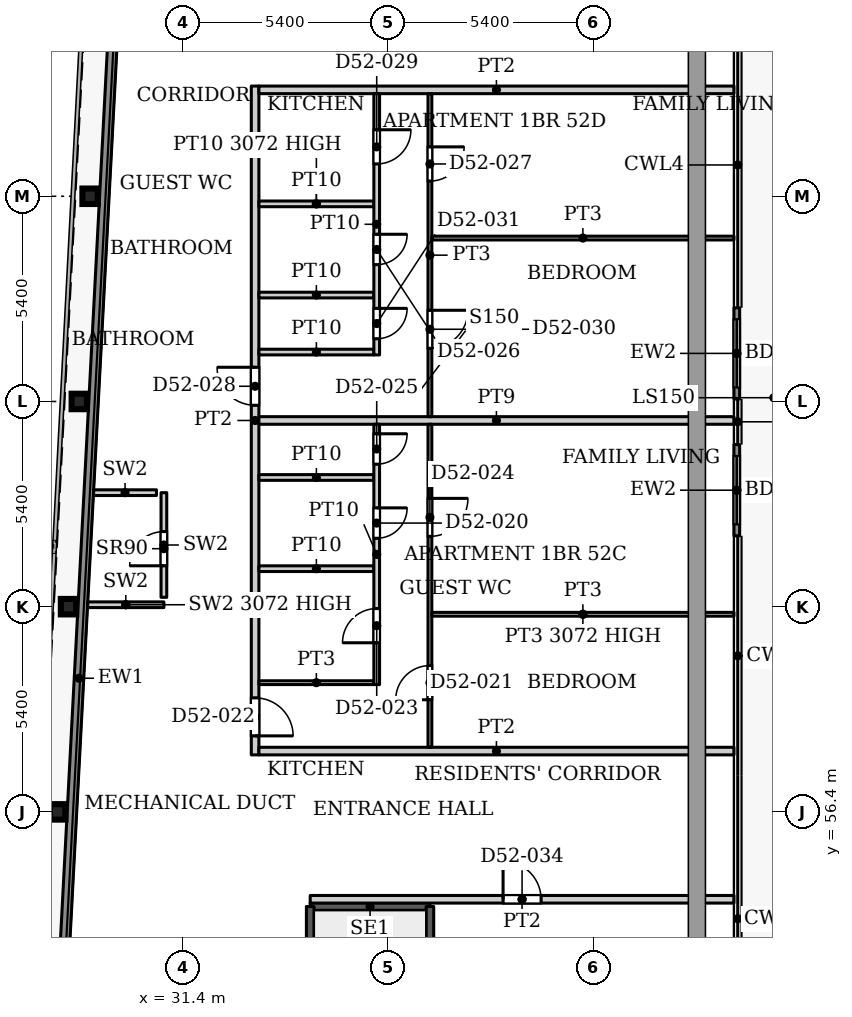
"""IFC4 building model, lengths in metres.
Left out: names, types, materials, properties, quantities, classifications, styles, units other than length and angle.
Written with IfcOpenShell. Run it as: python <this file> out.ifc"""

import sys

from ifc_helpers import new_model, si_unit, direction, frame, frame_2d, origin, origin_2d, place, context, subcontext, project, spatial, rectangle, i_section, extrude, source, transform, mapped, element, fill, save


model = new_model("IFC4")
c1 = context("Model", 3, precision=1e-05, world=origin(), true_north=direction((0.0, 1.0)))
c2 = subcontext(c1, "Body", "Model", "MODEL_VIEW")
j1 = project(units=[si_unit("LENGTHUNIT", "METRE"), si_unit("PLANEANGLEUNIT", "RADIAN")], contexts=[c1])
p1 = place(None, origin())
s1 = spatial("IfcSite", under=j1, at=p1, CompositionType="ELEMENT")
p2 = place(p1, origin())
s2 = spatial("IfcBuilding", under=s1, at=p2, CompositionType="ELEMENT")
p3 = place(p2, frame((0.0, 0.0, 224.0)))
s3 = spatial("IfcBuildingStorey", under=s2, at=p3, CompositionType="ELEMENT", Elevation=224.0)
for number, where, z_axis, x_axis in (
    (1, (28.106, 56.4, 0.0), (0.0, 0.0, 1.0), (1.0, 0.0, 0.0)),
    (2, (28.39, 61.8, 0.0), (0.0, 0.0, 1.0), (1.0, 0.0, 0.0)),
    (3, (28.674, 67.2, 0.0), (0.0, 0.0, 1.0), (1.0, 0.0, 0.0)),
    (4, (28.958, 72.6, 0.0), (0.0, 0.0, 1.0), (1.0, 0.0, 0.0)),
):
    element("IfcColumn", number, at=place(p3, frame(where, z_axis=z_axis, x_axis=x_axis)), inside=s3, PredefinedType="COLUMN", context=c2, shape_type="SweptSolid", body=[
        extrude(i_section(OverallWidth=0.404, OverallDepth=0.407, WebThickness=0.027, FlangeThickness=0.044, FilletRadius=0.012, at=origin_2d()), origin(), (0.0, 0.0, 1.0), 3.9),
    ])
p4 = place(p3, frame((45.975, 69.665, 0.0), z_axis=(0.0, 0.0, 1.0), x_axis=(0.0, -1.0, 0.0)))
e5 = element("IfcWall", 5, at=p4, inside=s3, PredefinedType="SOLIDWALL", context=c2, shape_type="SweptSolid", body=[
    extrude(rectangle(XDim=2.4, YDim=0.15, at=frame_2d((1.2, 0.0))), origin(), (0.0, 0.0, 1.0), 3.75),
])
p5 = place(p4, frame((0.3, 0.0, 0.0)))
e6 = element("IfcOpeningElement", 6, at=p5, cuts=e5, PredefinedType="OPENING", context=c2, shape_type="SweptSolid", body=[
    extrude(rectangle(XDim=1.8, YDim=2.4, at=frame_2d((0.9, 1.2))), frame((0.0, 0.085, 0.0), z_axis=(0.0, -1.0, 0.0), x_axis=(1.0, 0.0, 0.0)), (0.0, 0.0, 1.0), 0.17),
])
p6 = place(p3, frame((45.975, 66.065, 0.0), z_axis=(0.0, 0.0, 1.0), x_axis=(0.0, -1.0, 0.0)))
e7 = element("IfcWall", 7, at=p6, inside=s3, PredefinedType="SOLIDWALL", context=c2, shape_type="SweptSolid", body=[
    extrude(rectangle(XDim=2.4, YDim=0.15, at=frame_2d((1.2, 0.0))), origin(), (0.0, 0.0, 1.0), 3.75),
])
p7 = place(p6, frame((0.3, 0.0, 0.0)))
e8 = element("IfcOpeningElement", 8, at=p7, cuts=e7, PredefinedType="OPENING", context=c2, shape_type="SweptSolid", body=[
    extrude(rectangle(XDim=1.8, YDim=2.4, at=frame_2d((0.9, 1.2))), frame((0.0, 0.085, 0.0), z_axis=(0.0, -1.0, 0.0), x_axis=(1.0, 0.0, 0.0)), (0.0, 0.0, 1.0), 0.17),
])
p8 = place(p3, frame((27.195, 31.969, 0.0), z_axis=(0.0, 0.0, 1.0), x_axis=(0.052559748861, 0.998617781135, 0.0)))
e9 = element("IfcWall", 9, at=p8, inside=s3, PredefinedType="SOLIDWALL", context=c2, shape_type="SweptSolid", body=[
    extrude(rectangle(XDim=55.972, YDim=0.25, at=frame_2d((27.986, 0.0))), origin(), (0.0, 0.0, 1.0), 3.75),
])
p9 = place(p3, frame((34.75, 53.91, 0.0), z_axis=(0.0, 0.0, 1.0), x_axis=(1.0, 0.0, 0.0)))
e10 = element("IfcWall", 10, at=p9, inside=s3, PredefinedType="SHEAR", context=c2, shape_type="SweptSolid", body=[
    extrude(rectangle(XDim=3.15, YDim=0.2, at=frame_2d((1.575, 0.0))), origin(), (0.0, 0.0, 1.0), 3.9),
])
p10 = place(p3, frame((34.75, 47.5, 0.0), z_axis=(0.0, 0.0, 1.0), x_axis=(0.0, 1.0, 0.0)))
e11 = element("IfcWall", 11, at=p10, inside=s3, PredefinedType="SHEAR", context=c2, shape_type="SweptSolid", body=[
    extrude(rectangle(XDim=6.41, YDim=0.2, at=frame_2d((3.205, 0.0))), origin(), (0.0, 0.0, 1.0), 3.9),
])
p11 = place(p3, frame((37.9, 44.75, 0.0), z_axis=(0.0, 0.0, 1.0), x_axis=(0.0, 1.0, 0.0)))
e12 = element("IfcWall", 12, at=p11, inside=s3, PredefinedType="SHEAR", context=c2, shape_type="SweptSolid", body=[
    extrude(rectangle(XDim=9.16, YDim=0.2, at=frame_2d((4.58, 0.0))), origin(), (0.0, 0.0, 1.0), 3.9),
])
p12 = place(p3, frame((28.896, 61.851, 0.0), z_axis=(0.0, 0.0, 1.0), x_axis=(1.0, 0.0, 0.0)))
e13 = element("IfcWall", 13, at=p12, inside=s3, PredefinedType="PARTITIONING", context=c2, shape_type="SweptSolid", body=[
    extrude(rectangle(XDim=2.004, YDim=0.15, at=frame_2d((1.002, 0.0))), origin(), (0.0, 0.0, 1.0), 3.072),
])
p13 = place(p3, frame((30.9, 62.046, 0.0), z_axis=(0.0, 0.0, 1.0), x_axis=(0.0, 1.0, 0.0)))
e14 = element("IfcWall", 14, at=p13, inside=s3, PredefinedType="PARTITIONING", context=c2, shape_type="SweptSolid", body=[
    extrude(rectangle(XDim=2.754, YDim=0.15, at=frame_2d((1.377, 0.0))), origin(), (0.0, 0.0, 1.0), 3.9),
])
p14 = place(p13, frame((0.83, 0.0, 0.0)))
e15 = element("IfcOpeningElement", 15, at=p14, cuts=e14, PredefinedType="OPENING", context=c2, shape_type="SweptSolid", body=[
    extrude(rectangle(XDim=0.9, YDim=2.2, at=frame_2d((0.45, 1.1))), frame((0.0, 0.085, 0.0), z_axis=(0.0, -1.0, 0.0), x_axis=(1.0, 0.0, 0.0)), (0.0, 0.0, 1.0), 0.17),
])
p15 = place(p3, frame((29.051, 64.8, 0.0), z_axis=(0.0, 0.0, 1.0), x_axis=(1.0, 0.0, 0.0)))
e16 = element("IfcWall", 16, at=p15, inside=s3, PredefinedType="PARTITIONING", context=c2, shape_type="SweptSolid", body=[
    extrude(rectangle(XDim=1.654, YDim=0.15, at=frame_2d((0.827, 0.0))), origin(), (0.0, 0.0, 1.0), 3.9),
])
p16 = place(p3, frame((33.3, 57.9, 0.0), z_axis=(0.0, 0.0, 1.0), x_axis=(0.0, 1.0, 0.0)))
e17 = element("IfcWall", 17, at=p16, inside=s3, PredefinedType="PARTITIONING", context=c2, shape_type="SweptSolid", body=[
    extrude(rectangle(XDim=17.6, YDim=0.2, at=frame_2d((8.8, 0.0))), origin(), (0.0, 0.0, 1.0), 3.6),
])
p17 = place(p16, frame((0.5, 0.0, 0.0)))
e18 = element("IfcOpeningElement", 18, at=p17, cuts=e17, PredefinedType="OPENING", context=c2, shape_type="SweptSolid", body=[
    extrude(rectangle(XDim=1.0, YDim=2.1, at=frame_2d((0.5, 1.05))), frame((0.0, 0.11, 0.0), z_axis=(0.0, -1.0, 0.0), x_axis=(1.0, 0.0, 0.0)), (0.0, 0.0, 1.0), 0.22),
])
p18 = place(p16, frame((9.2, 0.0, 0.0)))
e19 = element("IfcOpeningElement", 19, at=p18, cuts=e17, PredefinedType="OPENING", context=c2, shape_type="SweptSolid", body=[
    extrude(rectangle(XDim=1.0, YDim=2.1, at=frame_2d((0.5, 1.05))), frame((0.0, 0.11, 0.0), z_axis=(0.0, -1.0, 0.0), x_axis=(1.0, 0.0, 0.0)), (0.0, 0.0, 1.0), 0.22),
])
p19 = place(p3, frame((33.4, 58.0, 0.0), z_axis=(0.0, 0.0, 1.0), x_axis=(1.0, 0.0, 0.0)))
e20 = element("IfcWall", 20, at=p19, inside=s3, PredefinedType="PARTITIONING", context=c2, shape_type="SweptSolid", body=[
    extrude(rectangle(XDim=12.5, YDim=0.2, at=frame_2d((6.25, 0.0))), origin(), (0.0, 0.0, 1.0), 3.6),
])
p20 = place(p3, frame((33.4, 59.8, 0.0), z_axis=(0.0, 0.0, 1.0), x_axis=(1.0, 0.0, 0.0)))
e21 = element("IfcWall", 21, at=p20, inside=s3, PredefinedType="PARTITIONING", context=c2, shape_type="SweptSolid", body=[
    extrude(rectangle(XDim=3.025, YDim=0.1, at=frame_2d((1.513, 0.0))), origin(), (0.0, 0.0, 1.0), 3.6),
])
for number, where, z_axis, x_axis in (
    (22, (33.4, 62.8, 0.0), (0.0, 0.0, 1.0), (1.0, 0.0, 0.0)),
    (23, (33.4, 65.2, 0.0), (0.0, 0.0, 1.0), (1.0, 0.0, 0.0)),
):
    element("IfcWall", number, at=place(p3, frame(where, z_axis=z_axis, x_axis=x_axis)), inside=s3, PredefinedType="PARTITIONING", context=c2, shape_type="SweptSolid", body=[
        extrude(rectangle(XDim=3.025, YDim=0.15, at=frame_2d((1.513, 0.0))), origin(), (0.0, 0.0, 1.0), 3.6),
    ])
p21 = place(p3, frame((33.4, 66.7, 0.0), z_axis=(0.0, 0.0, 1.0), x_axis=(1.0, 0.0, 0.0)))
e24 = element("IfcWall", 24, at=p21, inside=s3, PredefinedType="PARTITIONING", context=c2, shape_type="SweptSolid", body=[
    extrude(rectangle(XDim=12.5, YDim=0.2, at=frame_2d((6.25, 0.0))), origin(), (0.0, 0.0, 1.0), 3.6),
])
for number, where, z_axis, x_axis in (
    (25, (33.4, 68.5, 0.0), (0.0, 0.0, 1.0), (1.0, 0.0, 0.0)),
    (26, (33.4, 70.0, 0.0), (0.0, 0.0, 1.0), (1.0, 0.0, 0.0)),
):
    element("IfcWall", number, at=place(p3, frame(where, z_axis=z_axis, x_axis=x_axis)), inside=s3, PredefinedType="PARTITIONING", context=c2, shape_type="SweptSolid", body=[
        extrude(rectangle(XDim=3.025, YDim=0.15, at=frame_2d((1.513, 0.0))), origin(), (0.0, 0.0, 1.0), 3.6),
    ])
p22 = place(p3, frame((33.4, 72.4, 0.0), z_axis=(0.0, 0.0, 1.0), x_axis=(1.0, 0.0, 0.0)))
e27 = element("IfcWall", 27, at=p22, inside=s3, PredefinedType="PARTITIONING", context=c2, shape_type="SweptSolid", body=[
    extrude(rectangle(XDim=3.025, YDim=0.15, at=frame_2d((1.513, 0.0))), origin(), (0.0, 0.0, 1.0), 3.072),
])
p23 = place(p3, frame((33.4, 75.4, 0.0), z_axis=(0.0, 0.0, 1.0), x_axis=(1.0, 0.0, 0.0)))
e28 = element("IfcWall", 28, at=p23, inside=s3, PredefinedType="PARTITIONING", context=c2, shape_type="SweptSolid", body=[
    extrude(rectangle(XDim=12.5, YDim=0.2, at=frame_2d((6.25, 0.0))), origin(), (0.0, 0.0, 1.0), 3.6),
])
p24 = place(p3, frame((34.75, 54.1, 0.0), z_axis=(0.0, 0.0, 1.0), x_axis=(1.0, 0.0, 0.0)))
e29 = element("IfcWall", 29, at=p24, inside=s3, PredefinedType="PARTITIONING", context=c2, shape_type="SweptSolid", body=[
    extrude(rectangle(XDim=11.15, YDim=0.2, at=frame_2d((5.575, 0.0))), origin(), (0.0, 0.0, 1.0), 3.6),
])
p25 = place(p24, frame((5.075, 0.0, 0.0)))
e30 = element("IfcOpeningElement", 30, at=p25, cuts=e29, PredefinedType="OPENING", context=c2, shape_type="SweptSolid", body=[
    extrude(rectangle(XDim=1.0, YDim=2.1, at=frame_2d((0.5, 1.05))), frame((0.0, 0.11, 0.0), z_axis=(0.0, -1.0, 0.0), x_axis=(1.0, 0.0, 0.0)), (0.0, 0.0, 1.0), 0.22),
])
p26 = place(p3, frame((36.5, 59.75, 0.0), z_axis=(0.0, 0.0, 1.0), x_axis=(0.0, 1.0, 0.0)))
e31 = element("IfcWall", 31, at=p26, inside=s3, PredefinedType="PARTITIONING", context=c2, shape_type="SweptSolid", body=[
    extrude(rectangle(XDim=6.85, YDim=0.15, at=frame_2d((3.425, 0.0))), origin(), (0.0, 0.0, 1.0), 3.6),
])
p27 = place(p26, frame((3.85, 0.0, 0.0)))
e32 = element("IfcOpeningElement", 32, at=p27, cuts=e31, PredefinedType="OPENING", context=c2, shape_type="SweptSolid", body=[
    extrude(rectangle(XDim=0.8, YDim=2.1, at=frame_2d((0.4, 1.05))), frame((0.0, 0.085, 0.0), z_axis=(0.0, -1.0, 0.0), x_axis=(1.0, 0.0, 0.0)), (0.0, 0.0, 1.0), 0.17),
])
p28 = place(p26, frame((1.1, 0.0, 0.0)))
e33 = element("IfcOpeningElement", 33, at=p28, cuts=e31, PredefinedType="OPENING", context=c2, shape_type="SweptSolid", body=[
    extrude(rectangle(XDim=0.9, YDim=2.1, at=frame_2d((0.45, 1.05))), frame((0.0, 0.085, 0.0), z_axis=(0.0, -1.0, 0.0), x_axis=(1.0, 0.0, 0.0)), (0.0, 0.0, 1.0), 0.17),
])
p29 = place(p26, frame((5.8, 0.0, 0.0)))
e34 = element("IfcOpeningElement", 34, at=p29, cuts=e31, PredefinedType="OPENING", context=c2, shape_type="SweptSolid", body=[
    extrude(rectangle(XDim=0.8, YDim=2.1, at=frame_2d((0.4, 1.05))), frame((0.0, 0.085, 0.0), z_axis=(0.0, -1.0, 0.0), x_axis=(1.0, 0.0, 0.0)), (0.0, 0.0, 1.0), 0.17),
])
p30 = place(p3, frame((36.5, 68.425, 0.0), z_axis=(0.0, 0.0, 1.0), x_axis=(0.0, 1.0, 0.0)))
e35 = element("IfcWall", 35, at=p30, inside=s3, PredefinedType="PARTITIONING", context=c2, shape_type="SweptSolid", body=[
    extrude(rectangle(XDim=6.875, YDim=0.15, at=frame_2d((3.438, 0.0))), origin(), (0.0, 0.0, 1.0), 3.6),
])
p31 = place(p30, frame((2.375, 0.0, 0.0)))
e36 = element("IfcOpeningElement", 36, at=p31, cuts=e35, PredefinedType="OPENING", context=c2, shape_type="SweptSolid", body=[
    extrude(rectangle(XDim=0.8, YDim=2.1, at=frame_2d((0.4, 1.05))), frame((0.0, 0.085, 0.0), z_axis=(0.0, -1.0, 0.0), x_axis=(1.0, 0.0, 0.0)), (0.0, 0.0, 1.0), 0.17),
])
p32 = place(p30, frame((5.025, 0.0, 0.0)))
e37 = element("IfcOpeningElement", 37, at=p32, cuts=e35, PredefinedType="OPENING", context=c2, shape_type="SweptSolid", body=[
    extrude(rectangle(XDim=0.9, YDim=2.1, at=frame_2d((0.45, 1.05))), frame((0.0, 0.085, 0.0), z_axis=(0.0, -1.0, 0.0), x_axis=(1.0, 0.0, 0.0)), (0.0, 0.0, 1.0), 0.17),
])
p33 = place(p30, frame((0.425, 0.0, 0.0)))
e38 = element("IfcOpeningElement", 38, at=p33, cuts=e35, PredefinedType="OPENING", context=c2, shape_type="SweptSolid", body=[
    extrude(rectangle(XDim=0.8, YDim=2.1, at=frame_2d((0.4, 1.05))), frame((0.0, 0.085, 0.0), z_axis=(0.0, -1.0, 0.0), x_axis=(1.0, 0.0, 0.0)), (0.0, 0.0, 1.0), 0.17),
])
p34 = place(p3, frame((37.9, 58.1, 0.0), z_axis=(0.0, 0.0, 1.0), x_axis=(0.0, 1.0, 0.0)))
e39 = element("IfcWall", 39, at=p34, inside=s3, PredefinedType="PARTITIONING", context=c2, shape_type="SweptSolid", body=[
    extrude(rectangle(XDim=8.5, YDim=0.1, at=frame_2d((4.25, 0.0))), origin(), (0.0, 0.0, 1.0), 3.6),
])
p35 = place(p34, frame((1.25, 0.0, 0.0)))
e40 = element("IfcOpeningElement", 40, at=p35, cuts=e39, PredefinedType="OPENING", context=c2, shape_type="SweptSolid", body=[
    extrude(rectangle(XDim=0.9, YDim=2.1, at=frame_2d((0.45, 1.05))), frame((0.0, 0.06, 0.0), z_axis=(0.0, -1.0, 0.0), x_axis=(1.0, 0.0, 0.0)), (0.0, 0.0, 1.0), 0.12),
])
p36 = place(p34, frame((5.55, 0.0, 0.0)))
e41 = element("IfcOpeningElement", 41, at=p36, cuts=e39, PredefinedType="OPENING", context=c2, shape_type="SweptSolid", body=[
    extrude(rectangle(XDim=1.0, YDim=2.1, at=frame_2d((0.5, 1.05))), frame((0.0, 0.06, 0.0), z_axis=(0.0, -1.0, 0.0), x_axis=(1.0, 0.0, 0.0)), (0.0, 0.0, 1.0), 0.12),
])
p37 = place(p3, frame((37.9, 66.8, 0.0), z_axis=(0.0, 0.0, 1.0), x_axis=(0.0, 1.0, 0.0)))
e42 = element("IfcWall", 42, at=p37, inside=s3, PredefinedType="PARTITIONING", context=c2, shape_type="SweptSolid", body=[
    extrude(rectangle(XDim=8.5, YDim=0.1, at=frame_2d((4.25, 0.0))), origin(), (0.0, 0.0, 1.0), 3.6),
])
p38 = place(p37, frame((6.2, 0.0, 0.0)))
e43 = element("IfcOpeningElement", 43, at=p38, cuts=e42, PredefinedType="OPENING", context=c2, shape_type="SweptSolid", body=[
    extrude(rectangle(XDim=0.9, YDim=2.1, at=frame_2d((0.45, 1.05))), frame((0.0, 0.06, 0.0), z_axis=(0.0, -1.0, 0.0), x_axis=(1.0, 0.0, 0.0)), (0.0, 0.0, 1.0), 0.12),
])
p39 = place(p37, frame((1.8, 0.0, 0.0)))
e44 = element("IfcOpeningElement", 44, at=p39, cuts=e42, PredefinedType="OPENING", context=c2, shape_type="SweptSolid", body=[
    extrude(rectangle(XDim=1.0, YDim=2.1, at=frame_2d((0.5, 1.05))), frame((0.0, 0.06, 0.0), z_axis=(0.0, -1.0, 0.0), x_axis=(1.0, 0.0, 0.0)), (0.0, 0.0, 1.0), 0.12),
])
p40 = place(p3, frame((37.95, 61.6, 0.0), z_axis=(0.0, 0.0, 1.0), x_axis=(1.0, 0.0, 0.0)))
e45 = element("IfcWall", 45, at=p40, inside=s3, PredefinedType="PARTITIONING", context=c2, shape_type="SweptSolid", body=[
    extrude(rectangle(XDim=7.95, YDim=0.1, at=frame_2d((3.975, 0.0))), origin(), (0.0, 0.0, 1.0), 3.072),
])
p41 = place(p3, frame((37.95, 71.5, 0.0), z_axis=(0.0, 0.0, 1.0), x_axis=(1.0, 0.0, 0.0)))
e46 = element("IfcWall", 46, at=p41, inside=s3, PredefinedType="PARTITIONING", context=c2, shape_type="SweptSolid", body=[
    extrude(rectangle(XDim=7.95, YDim=0.1, at=frame_2d((3.975, 0.0))), origin(), (0.0, 0.0, 1.0), 3.6),
])
m1 = source(origin(), c2, "Body", "SweptSolid", [
    extrude(rectangle(XDim=1.8, YDim=2.4, at=frame_2d((0.9, 1.2))), frame((0.0, 0.025, 0.0), z_axis=(0.0, -1.0, 0.0), x_axis=(1.0, 0.0, 0.0)), (0.0, 0.0, 1.0), 0.05),
])
p42 = place(p5, origin())
e47 = element("IfcDoor", 47, at=p42, inside=s3, OperationType="SLIDING_TO_LEFT", PredefinedType="DOOR", context=c2, shape_type="MappedRepresentation", body=[
    mapped(m1, transform((0.0, 0.0, 0.0), x_axis=(1.0, 0.0, 0.0), y_axis=(0.0, 1.0, 0.0), z_axis=(0.0, 0.0, 1.0), scale=1.0)),
])
fill(e6, e47)
p43 = place(p7, origin())
e48 = element("IfcDoor", 48, at=p43, inside=s3, OperationType="SLIDING_TO_LEFT", PredefinedType="DOOR", context=c2, shape_type="MappedRepresentation", body=[
    mapped(m1, transform((0.0, 0.0, 0.0), x_axis=(1.0, 0.0, 0.0), y_axis=(0.0, 1.0, 0.0), z_axis=(0.0, 0.0, 1.0), scale=1.0)),
])
fill(e8, e48)
m2 = source(origin(), c2, "Body", "SweptSolid", [
    extrude(rectangle(XDim=0.9, YDim=2.2, at=frame_2d((0.45, 1.1))), frame((0.0, 0.025, 0.0), z_axis=(0.0, -1.0, 0.0), x_axis=(1.0, 0.0, 0.0)), (0.0, 0.0, 1.0), 0.05),
])
p44 = place(p14, origin())
e49 = element("IfcDoor", 49, at=p44, inside=s3, OperationType="SINGLE_SWING_LEFT", PredefinedType="DOOR", context=c2, shape_type="MappedRepresentation", body=[
    mapped(m2, transform((0.0, 0.0, 0.0), x_axis=(1.0, 0.0, 0.0), y_axis=(0.0, 1.0, 0.0), z_axis=(0.0, 0.0, 1.0), scale=1.0)),
])
fill(e15, e49)
m3 = source(origin(), c2, "Body", "SweptSolid", [
    extrude(rectangle(XDim=0.8, YDim=2.1, at=frame_2d((0.4, 1.05))), frame((0.0, 0.025, 0.0), z_axis=(0.0, -1.0, 0.0), x_axis=(1.0, 0.0, 0.0)), (0.0, 0.0, 1.0), 0.05),
])
p45 = place(p27, origin())
e50 = element("IfcDoor", 50, at=p45, inside=s3, OperationType="SINGLE_SWING_RIGHT", PredefinedType="DOOR", context=c2, shape_type="MappedRepresentation", body=[
    mapped(m3, transform((0.0, 0.0, 0.0), x_axis=(1.0, 0.0, 0.0), y_axis=(0.0, 1.0, 0.0), z_axis=(0.0, 0.0, 1.0), scale=1.0)),
])
fill(e32, e50)
m4 = source(origin(), c2, "Body", "SweptSolid", [
    extrude(rectangle(XDim=0.9, YDim=2.1, at=frame_2d((0.45, 1.05))), frame((0.0, 0.025, 0.0), z_axis=(0.0, -1.0, 0.0), x_axis=(1.0, 0.0, 0.0)), (0.0, 0.0, 1.0), 0.05),
])
p46 = place(p35, origin())
e51 = element("IfcDoor", 51, at=p46, inside=s3, OperationType="SINGLE_SWING_LEFT", PredefinedType="DOOR", context=c2, shape_type="MappedRepresentation", body=[
    mapped(m4, transform((0.0, 0.0, 0.0), x_axis=(1.0, 0.0, 0.0), y_axis=(0.0, 1.0, 0.0), z_axis=(0.0, 0.0, 1.0), scale=1.0)),
])
fill(e40, e51)
m5 = source(origin(), c2, "Body", "SweptSolid", [
    extrude(rectangle(XDim=1.0, YDim=2.1, at=frame_2d((0.5, 1.05))), frame((0.0, 0.025, 0.0), z_axis=(0.0, -1.0, 0.0), x_axis=(1.0, 0.0, 0.0)), (0.0, 0.0, 1.0), 0.05),
])
p47 = place(p17, origin())
e52 = element("IfcDoor", 52, at=p47, inside=s3, OperationType="SINGLE_SWING_RIGHT", PredefinedType="DOOR", context=c2, shape_type="MappedRepresentation", body=[
    mapped(m5, transform((0.0, 0.0, 0.0), x_axis=(1.0, 0.0, 0.0), y_axis=(0.0, 1.0, 0.0), z_axis=(0.0, 0.0, 1.0), scale=1.0)),
])
fill(e18, e52)
p48 = place(p28, origin())
e53 = element("IfcDoor", 53, at=p48, inside=s3, OperationType="SINGLE_SWING_LEFT", PredefinedType="DOOR", context=c2, shape_type="MappedRepresentation", body=[
    mapped(m4, transform((0.0, 0.0, 0.0), x_axis=(1.0, 0.0, 0.0), y_axis=(0.0, 1.0, 0.0), z_axis=(0.0, 0.0, 1.0), scale=1.0)),
])
fill(e33, e53)
m6 = source(origin(), c2, "Body", "SweptSolid", [
    extrude(rectangle(XDim=1.0, YDim=2.1, at=frame_2d((0.5, 1.05))), frame((0.0, 0.025, 0.0), z_axis=(0.0, -1.0, 0.0), x_axis=(1.0, 0.0, 0.0)), (0.0, 0.0, 1.0), 0.05),
])
p49 = place(p36, origin())
e54 = element("IfcDoor", 54, at=p49, inside=s3, OperationType="SINGLE_SWING_RIGHT", PredefinedType="DOOR", context=c2, shape_type="MappedRepresentation", body=[
    mapped(m6, transform((0.0, 0.0, 0.0), x_axis=(1.0, 0.0, 0.0), y_axis=(0.0, 1.0, 0.0), z_axis=(0.0, 0.0, 1.0), scale=1.0)),
])
fill(e41, e54)
p50 = place(p29, origin())
e55 = element("IfcDoor", 55, at=p50, inside=s3, OperationType="SINGLE_SWING_RIGHT", PredefinedType="DOOR", context=c2, shape_type="MappedRepresentation", body=[
    mapped(m3, transform((0.0, 0.0, 0.0), x_axis=(1.0, 0.0, 0.0), y_axis=(0.0, 1.0, 0.0), z_axis=(0.0, 0.0, 1.0), scale=1.0)),
])
fill(e34, e55)
p51 = place(p31, origin())
e56 = element("IfcDoor", 56, at=p51, inside=s3, OperationType="SINGLE_SWING_RIGHT", PredefinedType="DOOR", context=c2, shape_type="MappedRepresentation", body=[
    mapped(m3, transform((0.0, 0.0, 0.0), x_axis=(1.0, 0.0, 0.0), y_axis=(0.0, 1.0, 0.0), z_axis=(0.0, 0.0, 1.0), scale=1.0)),
])
fill(e36, e56)
p52 = place(p38, origin())
e57 = element("IfcDoor", 57, at=p52, inside=s3, OperationType="SINGLE_SWING_RIGHT", PredefinedType="DOOR", context=c2, shape_type="MappedRepresentation", body=[
    mapped(m4, transform((0.0, 0.0, 0.0), x_axis=(1.0, 0.0, 0.0), y_axis=(0.0, 1.0, 0.0), z_axis=(0.0, 0.0, 1.0), scale=1.0)),
])
fill(e43, e57)
p53 = place(p18, origin())
e58 = element("IfcDoor", 58, at=p53, inside=s3, OperationType="SINGLE_SWING_LEFT", PredefinedType="DOOR", context=c2, shape_type="MappedRepresentation", body=[
    mapped(m5, transform((0.0, 0.0, 0.0), x_axis=(1.0, 0.0, 0.0), y_axis=(0.0, 1.0, 0.0), z_axis=(0.0, 0.0, 1.0), scale=1.0)),
])
fill(e19, e58)
p54 = place(p32, origin())
e59 = element("IfcDoor", 59, at=p54, inside=s3, OperationType="SINGLE_SWING_RIGHT", PredefinedType="DOOR", context=c2, shape_type="MappedRepresentation", body=[
    mapped(m4, transform((0.0, 0.0, 0.0), x_axis=(1.0, 0.0, 0.0), y_axis=(0.0, 1.0, 0.0), z_axis=(0.0, 0.0, 1.0), scale=1.0)),
])
fill(e37, e59)
p55 = place(p39, origin())
e60 = element("IfcDoor", 60, at=p55, inside=s3, OperationType="SINGLE_SWING_RIGHT", PredefinedType="DOOR", context=c2, shape_type="MappedRepresentation", body=[
    mapped(m6, transform((0.0, 0.0, 0.0), x_axis=(1.0, 0.0, 0.0), y_axis=(0.0, 1.0, 0.0), z_axis=(0.0, 0.0, 1.0), scale=1.0)),
])
fill(e44, e60)
p56 = place(p33, origin())
e61 = element("IfcDoor", 61, at=p56, inside=s3, OperationType="SINGLE_SWING_RIGHT", PredefinedType="DOOR", context=c2, shape_type="MappedRepresentation", body=[
    mapped(m3, transform((0.0, 0.0, 0.0), x_axis=(1.0, 0.0, 0.0), y_axis=(0.0, 1.0, 0.0), z_axis=(0.0, 0.0, 1.0), scale=1.0)),
])
fill(e38, e61)
m7 = source(origin(), c2, "Body", "SweptSolid", [
    extrude(rectangle(XDim=1.0, YDim=2.1, at=frame_2d((0.5, 1.05))), frame((0.0, 0.025, 0.0), z_axis=(0.0, -1.0, 0.0), x_axis=(1.0, 0.0, 0.0)), (0.0, 0.0, 1.0), 0.05),
])
p57 = place(p25, origin())
e62 = element("IfcDoor", 62, at=p57, inside=s3, OperationType="SINGLE_SWING_LEFT", PredefinedType="DOOR", context=c2, shape_type="MappedRepresentation", body=[
    mapped(m7, transform((0.0, 0.0, 0.0), x_axis=(1.0, 0.0, 0.0), y_axis=(0.0, 1.0, 0.0), z_axis=(0.0, 0.0, 1.0), scale=1.0)),
])
fill(e30, e62)
save(model, sys.argv[1])
